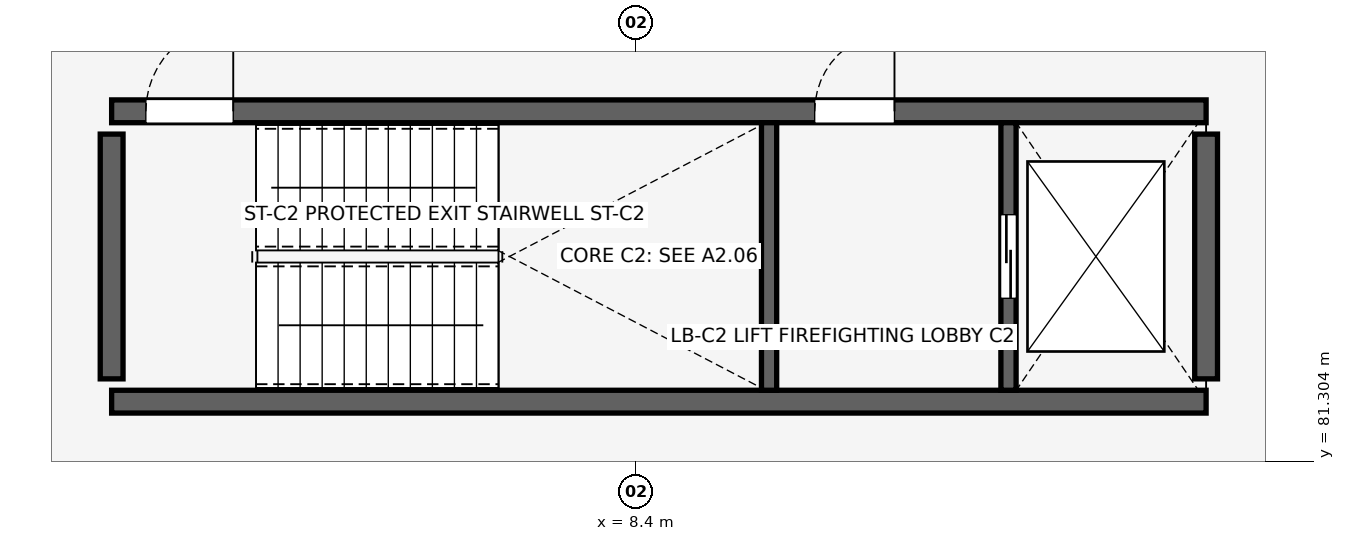
"""IFC4 building model, lengths in metres.
Left out: names, types, materials, properties, quantities, classifications, styles, units other than length and angle.
Written with IfcOpenShell. Run it as: python <this file> out.ifc"""

import sys

from ifc_helpers import new_model, si_unit, direction, frame, frame_2d, origin, place, context, subcontext, project, spatial, rectangle, extrude, element, fill, save


model = new_model("IFC4")
c1 = context("Model", 3, precision=1e-05, world=origin(), true_north=direction((0.0, 1.0)))
c2 = subcontext(c1, "Body", "Model", "MODEL_VIEW")
j1 = project(units=[si_unit("LENGTHUNIT", "METRE"), si_unit("PLANEANGLEUNIT", "RADIAN")], contexts=[c1])
p1 = place(None, origin())
s1 = spatial("IfcSite", under=j1, at=p1, CompositionType="ELEMENT")
p2 = place(p1, origin())
s2 = spatial("IfcBuilding", under=s1, at=p2, CompositionType="ELEMENT")
p3 = place(p2, frame((0.0, 0.0, 5.44)))
s3 = spatial("IfcBuildingStorey", under=s2, at=p3, CompositionType="ELEMENT", Elevation=5.44)
p4 = place(p3, frame((1.5, 82.09, 0.0), z_axis=(0.0, 0.0, 1.0), x_axis=(1.0, 0.0, 0.0)))
e1 = element("IfcWall", 1, at=p4, inside=s3, PredefinedType="SHEAR", context=c2, shape_type="SweptSolid", body=[
    extrude(rectangle(XDim=14.4, YDim=0.3, at=frame_2d((7.2, 0.0))), origin(), (0.0, 0.0, 1.0), 3.8),
])
p5 = place(p3, frame((1.5, 85.91, 0.0), z_axis=(0.0, 0.0, 1.0), x_axis=(1.0, 0.0, 0.0)))
e2 = element("IfcWall", 2, at=p5, inside=s3, PredefinedType="SHEAR", context=c2, shape_type="SweptSolid", body=[
    extrude(rectangle(XDim=14.4, YDim=0.3, at=frame_2d((7.2, 0.0))), origin(), (0.0, 0.0, 1.0), 3.8),
])
p6 = place(p5, frame((0.45, 0.0, 0.0), z_axis=(0.0, 0.0, 1.0), x_axis=(1.0, 0.0, 0.0)))
e3 = element("IfcOpeningElement", 3, at=p6, cuts=e2, PredefinedType="OPENING", context=c2, shape_type="SweptSolid", body=[
    extrude(rectangle(XDim=1.15, YDim=2.15, at=frame_2d((0.575, 1.075))), frame((0.0, 0.16, 0.0), z_axis=(0.0, -1.0, 0.0), x_axis=(1.0, 0.0, 0.0)), (0.0, 0.0, 1.0), 0.32),
])
p7 = place(p5, frame((9.25, 0.0, 0.0), z_axis=(0.0, 0.0, 1.0), x_axis=(1.0, 0.0, 0.0)))
e4 = element("IfcOpeningElement", 4, at=p7, cuts=e2, PredefinedType="OPENING", context=c2, shape_type="SweptSolid", body=[
    extrude(rectangle(XDim=1.05, YDim=2.15, at=frame_2d((0.525, 1.075))), frame((0.0, 0.16, 0.0), z_axis=(0.0, -1.0, 0.0), x_axis=(1.0, 0.0, 0.0)), (0.0, 0.0, 1.0), 0.32),
])
for number, where, z_axis, x_axis in (
    (5, (1.5, 82.39, 0.0), (0.0, 0.0, 1.0), (0.0, 1.0, 0.0)),
    (6, (15.9, 82.39, 0.0), (0.0, 0.0, 1.0), (0.0, 1.0, 0.0)),
):
    element("IfcWall", number, at=place(p3, frame(where, z_axis=z_axis, x_axis=x_axis)), inside=s3, PredefinedType="SHEAR", context=c2, shape_type="SweptSolid", body=[
        extrude(rectangle(XDim=3.22, YDim=0.3, at=frame_2d((1.61, 0.0))), origin(), (0.0, 0.0, 1.0), 3.8),
    ])
p8 = place(p3, frame((10.15, 82.24, 0.0), z_axis=(0.0, 0.0, 1.0), x_axis=(0.0, 1.0, 0.0)))
e7 = element("IfcWall", 7, at=p8, inside=s3, PredefinedType="SHEAR", context=c2, shape_type="SweptSolid", body=[
    extrude(rectangle(XDim=3.52, YDim=0.2, at=frame_2d((1.76, 0.0))), origin(), (0.0, 0.0, 1.0), 3.8),
])
p9 = place(p3, frame((13.3, 82.24, 0.0), z_axis=(0.0, 0.0, 1.0), x_axis=(0.0, 1.0, 0.0)))
e8 = element("IfcWall", 8, at=p9, inside=s3, PredefinedType="SHEAR", context=c2, shape_type="SweptSolid", body=[
    extrude(rectangle(XDim=3.52, YDim=0.2, at=frame_2d((1.76, 0.0))), origin(), (0.0, 0.0, 1.0), 3.8),
])
p10 = place(p9, frame((1.21, 0.0, 0.0), z_axis=(0.0, 0.0, 1.0), x_axis=(1.0, 0.0, 0.0)))
e9 = element("IfcOpeningElement", 9, at=p10, cuts=e8, PredefinedType="OPENING", context=c2, shape_type="SweptSolid", body=[
    extrude(rectangle(XDim=1.1, YDim=2.15, at=frame_2d((0.55, 1.075))), frame((0.0, 0.11, 0.0), z_axis=(0.0, -1.0, 0.0), x_axis=(1.0, 0.0, 0.0)), (0.0, 0.0, 1.0), 0.22),
])
p11 = place(p6, origin())
e10 = element("IfcDoor", 10, at=p11, inside=s3, OperationType="SINGLE_SWING_RIGHT", PredefinedType="DOOR", context=c2, shape_type="SweptSolid", body=[
    extrude(rectangle(XDim=1.15, YDim=2.15, at=frame_2d((0.575, 1.075))), frame((0.0, 0.025, 0.0), z_axis=(0.0, -1.0, 0.0), x_axis=(1.0, 0.0, 0.0)), (0.0, 0.0, 1.0), 0.05),
])
fill(e3, e10)
p12 = place(p7, origin())
e11 = element("IfcDoor", 11, at=p12, inside=s3, OperationType="SINGLE_SWING_RIGHT", PredefinedType="DOOR", context=c2, shape_type="SweptSolid", body=[
    extrude(rectangle(XDim=1.05, YDim=2.15, at=frame_2d((0.525, 1.075))), frame((0.0, 0.025, 0.0), z_axis=(0.0, -1.0, 0.0), x_axis=(1.0, 0.0, 0.0)), (0.0, 0.0, 1.0), 0.05),
])
fill(e4, e11)
p13 = place(p10, origin())
e12 = element("IfcDoor", 12, at=p13, inside=s3, OperationType="DOUBLE_DOOR_SLIDING", PredefinedType="DOOR", context=c2, shape_type="SweptSolid", body=[
    extrude(rectangle(XDim=1.1, YDim=2.15, at=frame_2d((0.55, 1.075))), frame((0.0, 0.025, 0.0), z_axis=(0.0, -1.0, 0.0), x_axis=(1.0, 0.0, 0.0)), (0.0, 0.0, 1.0), 0.05),
])
fill(e9, e12)
save(model, sys.argv[1])
